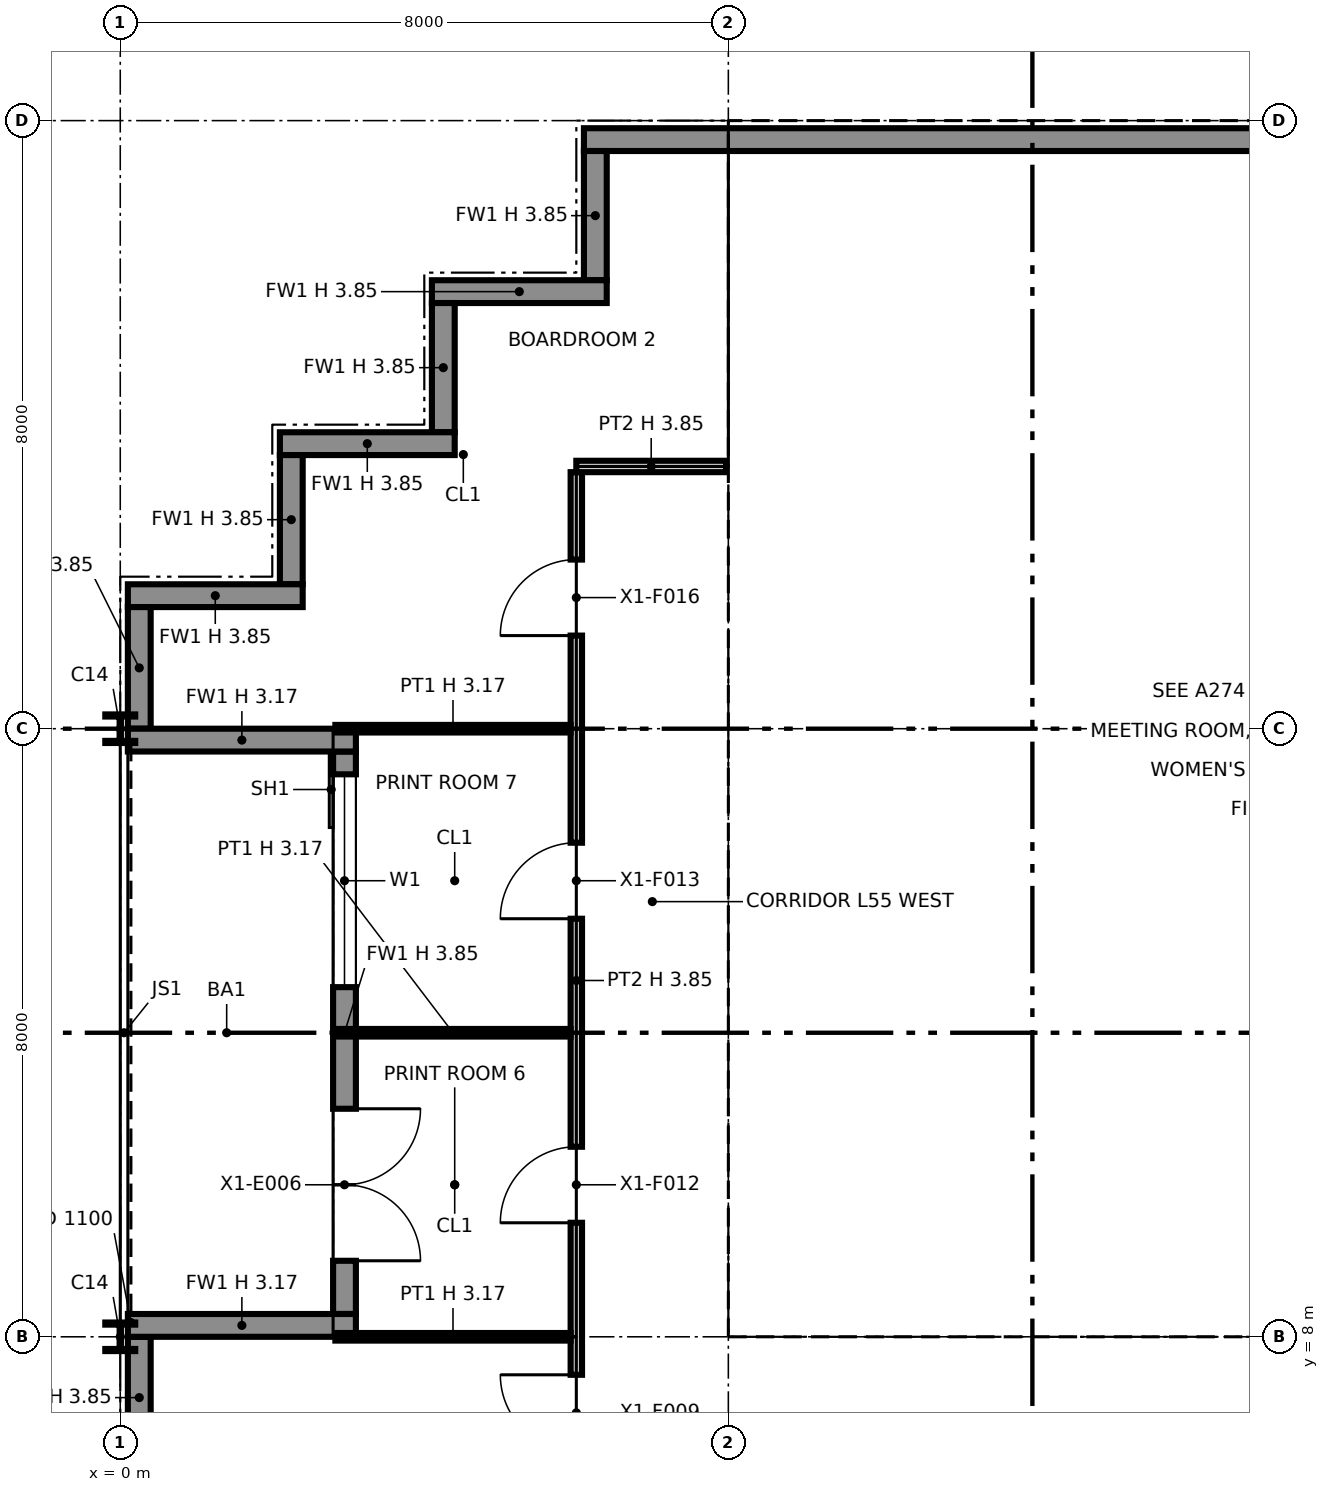
"""IFC4 building model, lengths in metres.
Left out: names, types, materials, properties, quantities, classifications, styles, units other than length and angle.
Written with IfcOpenShell. Run it as: python <this file> out.ifc"""

import sys

from ifc_helpers import new_model, si_unit, direction, frame, frame_2d, origin, origin_2d, place, context, subcontext, project, spatial, polyline, rectangle, i_section, outline, extrude, element, fill, save


model = new_model("IFC4")
c1 = context("Model", 3, precision=1e-05, world=origin(), true_north=direction((0.0, 1.0)))
c2 = subcontext(c1, "Body", "Model", "MODEL_VIEW")
j1 = project(units=[si_unit("LENGTHUNIT", "METRE"), si_unit("PLANEANGLEUNIT", "RADIAN")], contexts=[c1])
p1 = place(None, origin())
s1 = spatial("IfcSite", under=j1, at=p1, CompositionType="ELEMENT")
p2 = place(p1, origin())
s2 = spatial("IfcBuilding", under=s1, at=p2, CompositionType="ELEMENT")
p3 = place(p2, frame((0.0, 0.0, 255.0)))
s3 = spatial("IfcBuildingStorey", under=s2, at=p3, CompositionType="ELEMENT", Elevation=255.0)
for number, where, z_axis, x_axis in (
    (1, (0.0, 8.0, 0.0), (0.0, 0.0, 1.0), (1.0, 0.0, 0.0)),
    (2, (0.0, 16.0, 0.0), (0.0, 0.0, 1.0), (1.0, 0.0, 0.0)),
):
    element("IfcColumn", number, at=place(p3, frame(where, z_axis=z_axis, x_axis=x_axis)), inside=s3, PredefinedType="COLUMN", context=c2, shape_type="SweptSolid", body=[
        extrude(i_section(OverallWidth=0.394, OverallDepth=0.376, WebThickness=0.017, FlangeThickness=0.028, at=origin_2d()), origin(), (0.0, 0.0, 1.0), 3.85),
    ])
for number, where, z_axis, x_axis in (
    (3, (8.0, 8.0, 0.0), (0.0, 0.0, 1.0), (1.0, 0.0, 0.0)),
    (4, (8.0, 16.0, 0.0), (0.0, 0.0, 1.0), (1.0, 0.0, 0.0)),
):
    element("IfcColumn", number, at=place(p3, frame(where, z_axis=z_axis, x_axis=x_axis)), inside=s3, PredefinedType="COLUMN", context=c2, shape_type="SweptSolid", body=[
        extrude(i_section(OverallWidth=0.371, OverallDepth=0.361, WebThickness=0.012, FlangeThickness=0.02, at=origin_2d()), origin(), (0.0, 0.0, 1.0), 3.85),
    ])
p4 = place(p3, frame((8.0, 24.0, 0.0), z_axis=(0.0, 0.0, 1.0), x_axis=(1.0, 0.0, 0.0)))
e5 = element("IfcColumn", 5, at=p4, inside=s3, PredefinedType="COLUMN", context=c2, shape_type="SweptSolid", body=[
    extrude(i_section(OverallWidth=0.401, OverallDepth=0.399, WebThickness=0.025, FlangeThickness=0.04, at=origin_2d()), origin(), (0.0, 0.0, 1.0), 3.85),
])
p5 = place(p3, frame((32.0, 23.75, 0.0), z_axis=(0.0, 0.0, 1.0), x_axis=(-1.0, 0.0, 0.0)))
e6 = element("IfcWall", 6, at=p5, inside=s3, PredefinedType="SOLIDWALL", context=c2, shape_type="SweptSolid", body=[
    extrude(rectangle(XDim=25.9, YDim=0.3, at=frame_2d((12.95, 0.0))), origin(), (0.0, 0.0, 1.0), 3.85),
])
p6 = place(p3, frame((6.25, 23.6, 0.0), z_axis=(0.0, 0.0, 1.0), x_axis=(0.0, -1.0, 0.0)))
e7 = element("IfcWall", 7, at=p6, inside=s3, PredefinedType="SOLIDWALL", context=c2, shape_type="SweptSolid", body=[
    extrude(rectangle(XDim=1.7, YDim=0.3, at=frame_2d((0.85, 0.0))), origin(), (0.0, 0.0, 1.0), 3.85),
])
p7 = place(p3, frame((6.4, 21.75, 0.0), z_axis=(0.0, 0.0, 1.0), x_axis=(-1.0, 0.0, 0.0)))
e8 = element("IfcWall", 8, at=p7, inside=s3, PredefinedType="SOLIDWALL", context=c2, shape_type="SweptSolid", body=[
    extrude(rectangle(XDim=2.3, YDim=0.3, at=frame_2d((1.15, 0.0))), origin(), (0.0, 0.0, 1.0), 3.85),
])
p8 = place(p3, frame((4.25, 21.6, 0.0), z_axis=(0.0, 0.0, 1.0), x_axis=(0.0, -1.0, 0.0)))
e9 = element("IfcWall", 9, at=p8, inside=s3, PredefinedType="SOLIDWALL", context=c2, shape_type="SweptSolid", body=[
    extrude(rectangle(XDim=1.7, YDim=0.3, at=frame_2d((0.85, 0.0))), origin(), (0.0, 0.0, 1.0), 3.85),
])
p9 = place(p3, frame((4.4, 19.75, 0.0), z_axis=(0.0, 0.0, 1.0), x_axis=(-1.0, 0.0, 0.0)))
e10 = element("IfcWall", 10, at=p9, inside=s3, PredefinedType="SOLIDWALL", context=c2, shape_type="SweptSolid", body=[
    extrude(rectangle(XDim=2.3, YDim=0.3, at=frame_2d((1.15, 0.0))), origin(), (0.0, 0.0, 1.0), 3.85),
])
p10 = place(p3, frame((2.25, 19.6, 0.0), z_axis=(0.0, 0.0, 1.0), x_axis=(0.0, -1.0, 0.0)))
e11 = element("IfcWall", 11, at=p10, inside=s3, PredefinedType="SOLIDWALL", context=c2, shape_type="SweptSolid", body=[
    extrude(rectangle(XDim=1.7, YDim=0.3, at=frame_2d((0.85, 0.0))), origin(), (0.0, 0.0, 1.0), 3.85),
])
p11 = place(p3, frame((2.4, 17.75, 0.0), z_axis=(0.0, 0.0, 1.0), x_axis=(-1.0, 0.0, 0.0)))
e12 = element("IfcWall", 12, at=p11, inside=s3, PredefinedType="SOLIDWALL", context=c2, shape_type="SweptSolid", body=[
    extrude(rectangle(XDim=2.3, YDim=0.3, at=frame_2d((1.15, 0.0))), origin(), (0.0, 0.0, 1.0), 3.85),
])
p12 = place(p3, frame((0.25, 17.6, 0.0), z_axis=(0.0, 0.0, 1.0), x_axis=(0.0, -1.0, 0.0)))
e13 = element("IfcWall", 13, at=p12, inside=s3, PredefinedType="SOLIDWALL", context=c2, shape_type="SweptSolid", body=[
    extrude(rectangle(XDim=1.6, YDim=0.3, at=frame_2d((0.8, 0.0))), origin(), (0.0, 0.0, 1.0), 3.85),
])
p13 = place(p3, frame((2.95, 15.7, 0.0), z_axis=(0.0, 0.0, 1.0), x_axis=(0.0, -1.0, 0.0)))
e14 = element("IfcWall", 14, at=p13, inside=s3, PredefinedType="SOLIDWALL", context=c2, shape_type="SweptSolid", body=[
    extrude(rectangle(XDim=7.4, YDim=0.3, at=frame_2d((3.7, 0.0))), origin(), (0.0, 0.0, 1.0), 3.85),
])
p14 = place(p13, frame((0.3, 0.0, 0.9)))
e15 = element("IfcOpeningElement", 15, at=p14, cuts=e14, PredefinedType="OPENING", context=c2, shape_type="SweptSolid", body=[
    extrude(rectangle(XDim=2.8, YDim=2.2, at=frame_2d((1.4, 1.1))), frame((0.0, 0.16, 0.0), z_axis=(0.0, -1.0, 0.0), x_axis=(1.0, 0.0, 0.0)), (0.0, 0.0, 1.0), 0.32),
])
p15 = place(p13, frame((4.7, 0.0, 0.0)))
e16 = element("IfcOpeningElement", 16, at=p15, cuts=e14, PredefinedType="OPENING", context=c2, shape_type="SweptSolid", body=[
    extrude(rectangle(XDim=2.0, YDim=2.4, at=frame_2d((1.0, 1.2))), frame((0.0, 0.16, 0.0), z_axis=(0.0, -1.0, 0.0), x_axis=(1.0, 0.0, 0.0)), (0.0, 0.0, 1.0), 0.32),
])
for number, where, z_axis, x_axis in (
    (17, (0.1, 15.85, 0.0), (0.0, 0.0, 1.0), (1.0, 0.0, 0.0)),
    (18, (0.1, 8.15, 0.0), (0.0, 0.0, 1.0), (1.0, 0.0, 0.0)),
):
    element("IfcWall", number, at=place(p3, frame(where, z_axis=z_axis, x_axis=x_axis)), inside=s3, PredefinedType="SOLIDWALL", context=c2, shape_type="SweptSolid", body=[
        extrude(rectangle(XDim=3.0, YDim=0.3, at=frame_2d((1.5, 0.0))), origin(), (0.0, 0.0, 1.0), 3.171),
    ])
p16 = place(p3, frame((0.25, 8.0, 0.0), z_axis=(0.0, 0.0, 1.0), x_axis=(0.0, -1.0, 0.0)))
e19 = element("IfcWall", 19, at=p16, inside=s3, PredefinedType="SOLIDWALL", context=c2, shape_type="SweptSolid", body=[
    extrude(rectangle(XDim=1.6, YDim=0.3, at=frame_2d((0.8, 0.0))), origin(), (0.0, 0.0, 1.0), 3.85),
])
p17 = place(p3, frame((8.65, 8.75, 0.0), z_axis=(0.0, 0.0, 1.0), x_axis=(1.0, 0.0, 0.0)))
e20 = element("IfcWall", 20, at=p17, inside=s3, PredefinedType="PARTITIONING", context=c2, shape_type="SweptSolid", body=[
    extrude(outline(polyline([(0.0, 0.0), (14.7, 0.0), (14.7, 3.85), (7.438, 3.85), (7.438, 3.308), (7.262, 3.308), (7.261, 3.85), (0.0, 3.85), (0.0, 0.0)])), frame((0.0, 0.1, 0.0), z_axis=(0.0, -1.0, 0.0), x_axis=(1.0, 0.0, 0.0)), (0.0, 0.0, 1.0), 0.2),
])
p18 = place(p17, frame((1.3, 0.0, 0.0)))
e21 = element("IfcOpeningElement", 21, at=p18, cuts=e20, PredefinedType="OPENING", context=c2, shape_type="SweptSolid", body=[
    extrude(rectangle(XDim=1.4, YDim=2.1, at=frame_2d((0.7, 1.05))), frame((0.0, 0.11, 0.0), z_axis=(0.0, -1.0, 0.0), x_axis=(1.0, 0.0, 0.0)), (0.0, 0.0, 1.0), 0.22),
])
p19 = place(p17, frame((4.6, 0.0, 0.0)))
e22 = element("IfcOpeningElement", 22, at=p19, cuts=e20, PredefinedType="OPENING", context=c2, shape_type="SweptSolid", body=[
    extrude(rectangle(XDim=1.4, YDim=2.1, at=frame_2d((0.7, 1.05))), frame((0.0, 0.11, 0.0), z_axis=(0.0, -1.0, 0.0), x_axis=(1.0, 0.0, 0.0)), (0.0, 0.0, 1.0), 0.22),
])
p20 = place(p17, frame((10.4, 0.0, 0.0)))
e23 = element("IfcOpeningElement", 23, at=p20, cuts=e20, PredefinedType="OPENING", context=c2, shape_type="SweptSolid", body=[
    extrude(rectangle(XDim=1.2, YDim=2.1, at=frame_2d((0.6, 1.05))), frame((0.0, 0.11, 0.0), z_axis=(0.0, -1.0, 0.0), x_axis=(1.0, 0.0, 0.0)), (0.0, 0.0, 1.0), 0.22),
])
p21 = place(p3, frame((8.75, 8.85, 0.0), z_axis=(0.0, 0.0, 1.0), x_axis=(0.0, 1.0, 0.0)))
e24 = element("IfcWall", 24, at=p21, inside=s3, PredefinedType="PARTITIONING", context=c2, shape_type="SweptSolid", body=[
    extrude(outline(polyline([(0.0, 0.0), (14.3, 0.0), (14.3, 3.85), (10.225, 3.85), (10.224, 3.44), (10.076, 3.44), (10.075, 3.85), (7.239, 3.85), (7.238, 3.308), (7.062, 3.308), (7.062, 3.85), (0.0, 3.85), (0.0, 0.0)])), frame((0.0, 0.1, 0.0), z_axis=(0.0, -1.0, 0.0), x_axis=(1.0, 0.0, 0.0)), (0.0, 0.0, 1.0), 0.2),
])
p22 = place(p21, frame((8.3, 0.0, 0.0)))
e25 = element("IfcOpeningElement", 25, at=p22, cuts=e24, PredefinedType="OPENING", context=c2, shape_type="SweptSolid", body=[
    extrude(rectangle(XDim=1.8, YDim=2.1, at=frame_2d((0.9, 1.05))), frame((0.0, 0.11, 0.0), z_axis=(0.0, -1.0, 0.0), x_axis=(1.0, 0.0, 0.0)), (0.0, 0.0, 1.0), 0.22),
])
p23 = place(p3, frame((8.65, 23.25, 0.0), z_axis=(0.0, 0.0, 1.0), x_axis=(1.0, 0.0, 0.0)))
e26 = element("IfcWall", 26, at=p23, inside=s3, PredefinedType="PARTITIONING", context=c2, shape_type="SweptSolid", body=[
    extrude(outline(polyline([(0.0, 0.0), (14.7, 0.0), (14.7, 3.85), (7.438, 3.85), (7.438, 3.308), (7.262, 3.308), (7.261, 3.85), (0.0, 3.85), (0.0, 0.0)])), frame((0.0, 0.1, 0.0), z_axis=(0.0, -1.0, 0.0), x_axis=(1.0, 0.0, 0.0)), (0.0, 0.0, 1.0), 0.2),
])
p24 = place(p3, frame((8.85, 16.0, 0.0), z_axis=(0.0, 0.0, 1.0), x_axis=(1.0, 0.0, 0.0)))
e27 = element("IfcWall", 27, at=p24, inside=s3, PredefinedType="PARTITIONING", context=c2, shape_type="SweptSolid", body=[
    extrude(rectangle(XDim=6.954, YDim=0.6, at=frame_2d((3.477, 0.0))), origin(), (0.0, 0.0, 1.0), 3.308),
])
p25 = place(p3, frame((8.85, 19.9, 0.0), z_axis=(0.0, 0.0, 1.0), x_axis=(1.0, 0.0, 0.0)))
e28 = element("IfcWall", 28, at=p25, inside=s3, PredefinedType="PARTITIONING", context=c2, shape_type="SweptSolid", body=[
    extrude(outline(polyline([(0.0, 0.0), (14.3, 0.0), (14.3, 3.85), (7.239, 3.85), (7.238, 3.308), (7.062, 3.308), (7.062, 3.85), (0.0, 3.85), (0.0, 0.0)])), frame((0.0, 0.1, 0.0), z_axis=(0.0, -1.0, 0.0), x_axis=(1.0, 0.0, 0.0)), (0.0, 0.0, 1.0), 0.2),
])
p26 = place(p25, frame((2.125, 0.0, 0.0)))
e29 = element("IfcOpeningElement", 29, at=p26, cuts=e28, PredefinedType="OPENING", context=c2, shape_type="SweptSolid", body=[
    extrude(rectangle(XDim=0.9, YDim=2.1, at=frame_2d((0.45, 1.05))), frame((0.0, 0.11, 0.0), z_axis=(0.0, -1.0, 0.0), x_axis=(1.0, 0.0, 0.0)), (0.0, 0.0, 1.0), 0.22),
])
p27 = place(p25, frame((5.65, 0.0, 0.0)))
e30 = element("IfcOpeningElement", 30, at=p27, cuts=e28, PredefinedType="OPENING", context=c2, shape_type="SweptSolid", body=[
    extrude(rectangle(XDim=1.1, YDim=2.1, at=frame_2d((0.55, 1.05))), frame((0.0, 0.11, 0.0), z_axis=(0.0, -1.0, 0.0), x_axis=(1.0, 0.0, 0.0)), (0.0, 0.0, 1.0), 0.22),
])
p28 = place(p25, frame((7.95, 0.0, 0.0)))
e31 = element("IfcOpeningElement", 31, at=p28, cuts=e28, PredefinedType="OPENING", context=c2, shape_type="SweptSolid", body=[
    extrude(rectangle(XDim=1.1, YDim=2.1, at=frame_2d((0.55, 1.05))), frame((0.0, 0.11, 0.0), z_axis=(0.0, -1.0, 0.0), x_axis=(1.0, 0.0, 0.0)), (0.0, 0.0, 1.0), 0.22),
])
p29 = place(p25, frame((10.25, 0.0, 0.0)))
e32 = element("IfcOpeningElement", 32, at=p29, cuts=e28, PredefinedType="OPENING", context=c2, shape_type="SweptSolid", body=[
    extrude(rectangle(XDim=1.1, YDim=2.1, at=frame_2d((0.55, 1.05))), frame((0.0, 0.11, 0.0), z_axis=(0.0, -1.0, 0.0), x_axis=(1.0, 0.0, 0.0)), (0.0, 0.0, 1.0), 0.22),
])
p30 = place(p25, frame((12.625, 0.0, 0.0)))
e33 = element("IfcOpeningElement", 33, at=p30, cuts=e28, PredefinedType="OPENING", context=c2, shape_type="SweptSolid", body=[
    extrude(rectangle(XDim=1.1, YDim=2.1, at=frame_2d((0.55, 1.05))), frame((0.0, 0.11, 0.0), z_axis=(0.0, -1.0, 0.0), x_axis=(1.0, 0.0, 0.0)), (0.0, 0.0, 1.0), 0.22),
])
p31 = place(p3, frame((12.4, 8.85, 0.0), z_axis=(0.0, 0.0, 1.0), x_axis=(0.0, 1.0, 0.0)))
e34 = element("IfcWall", 34, at=p31, inside=s3, PredefinedType="PARTITIONING", context=c2, shape_type="SweptSolid", body=[
    extrude(rectangle(XDim=6.85, YDim=0.2, at=frame_2d((3.425, 0.0))), origin(), (0.0, 0.0, 1.0), 3.85),
])
p32 = place(p3, frame((13.925, 20.0, 0.0), z_axis=(0.0, 0.0, 1.0), x_axis=(0.0, 1.0, 0.0)))
e35 = element("IfcWall", 35, at=p32, inside=s3, PredefinedType="PARTITIONING", context=c2, shape_type="SweptSolid", body=[
    extrude(rectangle(XDim=3.15, YDim=0.15, at=frame_2d((1.575, 0.0))), origin(), (0.0, 0.0, 1.0), 3.85),
])
p33 = place(p3, frame((6.0, 6.0, 0.0), z_axis=(0.0, 0.0, 1.0), x_axis=(0.0, 1.0, 0.0)))
e36 = element("IfcWall", 36, at=p33, inside=s3, PredefinedType="PARTITIONING", context=c2, shape_type="SweptSolid", body=[
    extrude(outline(polyline([(0.0, 0.0), (13.375, 0.0), (13.375, 3.85), (10.3, 3.85), (10.298, 3.172), (9.702, 3.172), (9.7, 3.85), (6.3, 3.85), (6.298, 3.172), (5.702, 3.172), (5.7, 3.85), (2.3, 3.85), (2.298, 3.172), (1.702, 3.172), (1.7, 3.85), (0.0, 3.85), (0.0, 0.0)])), frame((0.0, 0.075, 0.0), z_axis=(0.0, -1.0, 0.0), x_axis=(1.0, 0.0, 0.0)), (0.0, 0.0, 1.0), 0.15),
])
p34 = place(p33, frame((0.5, 0.0, 0.0)))
e37 = element("IfcOpeningElement", 37, at=p34, cuts=e36, PredefinedType="OPENING", context=c2, shape_type="SweptSolid", body=[
    extrude(rectangle(XDim=1.0, YDim=2.1, at=frame_2d((0.5, 1.05))), frame((0.0, 0.085, 0.0), z_axis=(0.0, -1.0, 0.0), x_axis=(1.0, 0.0, 0.0)), (0.0, 0.0, 1.0), 0.17),
])
p35 = place(p33, frame((3.5, 0.0, 0.0)))
e38 = element("IfcOpeningElement", 38, at=p35, cuts=e36, PredefinedType="OPENING", context=c2, shape_type="SweptSolid", body=[
    extrude(rectangle(XDim=1.0, YDim=2.1, at=frame_2d((0.5, 1.05))), frame((0.0, 0.085, 0.0), z_axis=(0.0, -1.0, 0.0), x_axis=(1.0, 0.0, 0.0)), (0.0, 0.0, 1.0), 0.17),
])
p36 = place(p33, frame((7.5, 0.0, 0.0)))
e39 = element("IfcOpeningElement", 39, at=p36, cuts=e36, PredefinedType="OPENING", context=c2, shape_type="SweptSolid", body=[
    extrude(rectangle(XDim=1.0, YDim=2.1, at=frame_2d((0.5, 1.05))), frame((0.0, 0.085, 0.0), z_axis=(0.0, -1.0, 0.0), x_axis=(1.0, 0.0, 0.0)), (0.0, 0.0, 1.0), 0.17),
])
p37 = place(p33, frame((11.225, 0.0, 0.0)))
e40 = element("IfcOpeningElement", 40, at=p37, cuts=e36, PredefinedType="OPENING", context=c2, shape_type="SweptSolid", body=[
    extrude(rectangle(XDim=1.0, YDim=2.1, at=frame_2d((0.5, 1.05))), frame((0.0, 0.085, 0.0), z_axis=(0.0, -1.0, 0.0), x_axis=(1.0, 0.0, 0.0)), (0.0, 0.0, 1.0), 0.17),
])
for number, where, z_axis, x_axis in (
    (41, (2.83, 8.0, 0.0), (0.0, 0.0, 1.0), (1.0, 0.0, 0.0)),
    (42, (2.83, 12.0, 0.0), (0.0, 0.0, 1.0), (1.0, 0.0, 0.0)),
    (43, (2.83, 16.0, 0.0), (0.0, 0.0, 1.0), (1.0, 0.0, 0.0)),
):
    element("IfcWall", number, at=place(p3, frame(where, z_axis=z_axis, x_axis=x_axis)), inside=s3, PredefinedType="PARTITIONING", context=c2, shape_type="SweptSolid", body=[
        extrude(rectangle(XDim=3.095, YDim=0.1, at=frame_2d((1.547, 0.0))), origin(), (0.0, 0.0, 1.0), 3.172),
    ])
p38 = place(p3, frame((6.0, 19.45, 0.0), z_axis=(0.0, 0.0, 1.0), x_axis=(1.0, 0.0, 0.0)))
e44 = element("IfcWall", 44, at=p38, inside=s3, PredefinedType="PARTITIONING", context=c2, shape_type="SweptSolid", body=[
    extrude(rectangle(XDim=1.97, YDim=0.15, at=frame_2d((0.985, 0.0))), origin(), (0.0, 0.0, 1.0), 3.85),
])
p39 = place(p14, origin())
e45 = element("IfcWindow", 45, at=p39, inside=s3, PartitioningType="SINGLE_PANEL", PredefinedType="WINDOW", context=c2, shape_type="SweptSolid", body=[
    extrude(rectangle(XDim=2.8, YDim=2.2, at=frame_2d((1.4, 1.1))), frame((0.0, 0.03, 0.0), z_axis=(0.0, -1.0, 0.0), x_axis=(1.0, 0.0, 0.0)), (0.0, 0.0, 1.0), 0.06),
])
fill(e15, e45)
p40 = place(p15, origin())
e46 = element("IfcDoor", 46, at=p40, inside=s3, OperationType="DOUBLE_DOOR_SINGLE_SWING", PredefinedType="DOOR", context=c2, shape_type="SweptSolid", body=[
    extrude(rectangle(XDim=2.0, YDim=2.4, at=frame_2d((1.0, 1.2))), frame((0.0, 0.025, 0.0), z_axis=(0.0, -1.0, 0.0), x_axis=(1.0, 0.0, 0.0)), (0.0, 0.0, 1.0), 0.05),
])
fill(e16, e46)
p41 = place(p22, origin())
e47 = element("IfcDoor", 47, at=p41, inside=s3, OperationType="DOUBLE_DOOR_SINGLE_SWING", PredefinedType="NOTDEFINED", context=c2, shape_type="SweptSolid", body=[
    extrude(rectangle(XDim=1.8, YDim=2.1, at=frame_2d((0.9, 1.05))), frame((0.0, 0.025, 0.0), z_axis=(0.0, -1.0, 0.0), x_axis=(1.0, 0.0, 0.0)), (0.0, 0.0, 1.0), 0.05),
])
fill(e25, e47)
p42 = place(p18, origin())
e48 = element("IfcDoor", 48, at=p42, inside=s3, OperationType="DOUBLE_DOOR_SINGLE_SWING", PredefinedType="NOTDEFINED", context=c2, shape_type="SweptSolid", body=[
    extrude(rectangle(XDim=1.4, YDim=2.1, at=frame_2d((0.7, 1.05))), frame((0.0, 0.025, 0.0), z_axis=(0.0, -1.0, 0.0), x_axis=(1.0, 0.0, 0.0)), (0.0, 0.0, 1.0), 0.05),
])
fill(e21, e48)
p43 = place(p26, origin())
e49 = element("IfcDoor", 49, at=p43, inside=s3, OperationType="SINGLE_SWING_RIGHT", PredefinedType="NOTDEFINED", context=c2, shape_type="SweptSolid", body=[
    extrude(rectangle(XDim=0.9, YDim=2.1, at=frame_2d((0.45, 1.05))), frame((0.0, 0.025, 0.0), z_axis=(0.0, -1.0, 0.0), x_axis=(1.0, 0.0, 0.0)), (0.0, 0.0, 1.0), 0.05),
])
fill(e29, e49)
p44 = place(p19, origin())
e50 = element("IfcDoor", 50, at=p44, inside=s3, OperationType="DOUBLE_DOOR_SINGLE_SWING", PredefinedType="NOTDEFINED", context=c2, shape_type="SweptSolid", body=[
    extrude(rectangle(XDim=1.4, YDim=2.1, at=frame_2d((0.7, 1.05))), frame((0.0, 0.025, 0.0), z_axis=(0.0, -1.0, 0.0), x_axis=(1.0, 0.0, 0.0)), (0.0, 0.0, 1.0), 0.05),
])
fill(e22, e50)
p45 = place(p27, origin())
e51 = element("IfcDoor", 51, at=p45, inside=s3, OperationType="SLIDING_TO_LEFT", PredefinedType="NOTDEFINED", context=c2, shape_type="SweptSolid", body=[
    extrude(rectangle(XDim=1.1, YDim=2.1, at=frame_2d((0.55, 1.05))), frame((0.0, 0.025, 0.0), z_axis=(0.0, -1.0, 0.0), x_axis=(1.0, 0.0, 0.0)), (0.0, 0.0, 1.0), 0.05),
])
fill(e30, e51)
p46 = place(p34, origin())
e52 = element("IfcDoor", 52, at=p46, inside=s3, OperationType="SINGLE_SWING_RIGHT", PredefinedType="DOOR", context=c2, shape_type="SweptSolid", body=[
    extrude(rectangle(XDim=1.0, YDim=2.1, at=frame_2d((0.5, 1.05))), frame((0.0, 0.025, 0.0), z_axis=(0.0, -1.0, 0.0), x_axis=(1.0, 0.0, 0.0)), (0.0, 0.0, 1.0), 0.05),
])
fill(e37, e52)
p47 = place(p35, origin())
e53 = element("IfcDoor", 53, at=p47, inside=s3, OperationType="SINGLE_SWING_LEFT", PredefinedType="DOOR", context=c2, shape_type="SweptSolid", body=[
    extrude(rectangle(XDim=1.0, YDim=2.1, at=frame_2d((0.5, 1.05))), frame((0.0, 0.025, 0.0), z_axis=(0.0, -1.0, 0.0), x_axis=(1.0, 0.0, 0.0)), (0.0, 0.0, 1.0), 0.05),
])
fill(e38, e53)
p48 = place(p36, origin())
e54 = element("IfcDoor", 54, at=p48, inside=s3, OperationType="SINGLE_SWING_LEFT", PredefinedType="DOOR", context=c2, shape_type="SweptSolid", body=[
    extrude(rectangle(XDim=1.0, YDim=2.1, at=frame_2d((0.5, 1.05))), frame((0.0, 0.025, 0.0), z_axis=(0.0, -1.0, 0.0), x_axis=(1.0, 0.0, 0.0)), (0.0, 0.0, 1.0), 0.05),
])
fill(e39, e54)
p49 = place(p37, origin())
e55 = element("IfcDoor", 55, at=p49, inside=s3, OperationType="SINGLE_SWING_LEFT", PredefinedType="DOOR", context=c2, shape_type="SweptSolid", body=[
    extrude(rectangle(XDim=1.0, YDim=2.1, at=frame_2d((0.5, 1.05))), frame((0.0, 0.025, 0.0), z_axis=(0.0, -1.0, 0.0), x_axis=(1.0, 0.0, 0.0)), (0.0, 0.0, 1.0), 0.05),
])
fill(e40, e55)
save(model, sys.argv[1])
